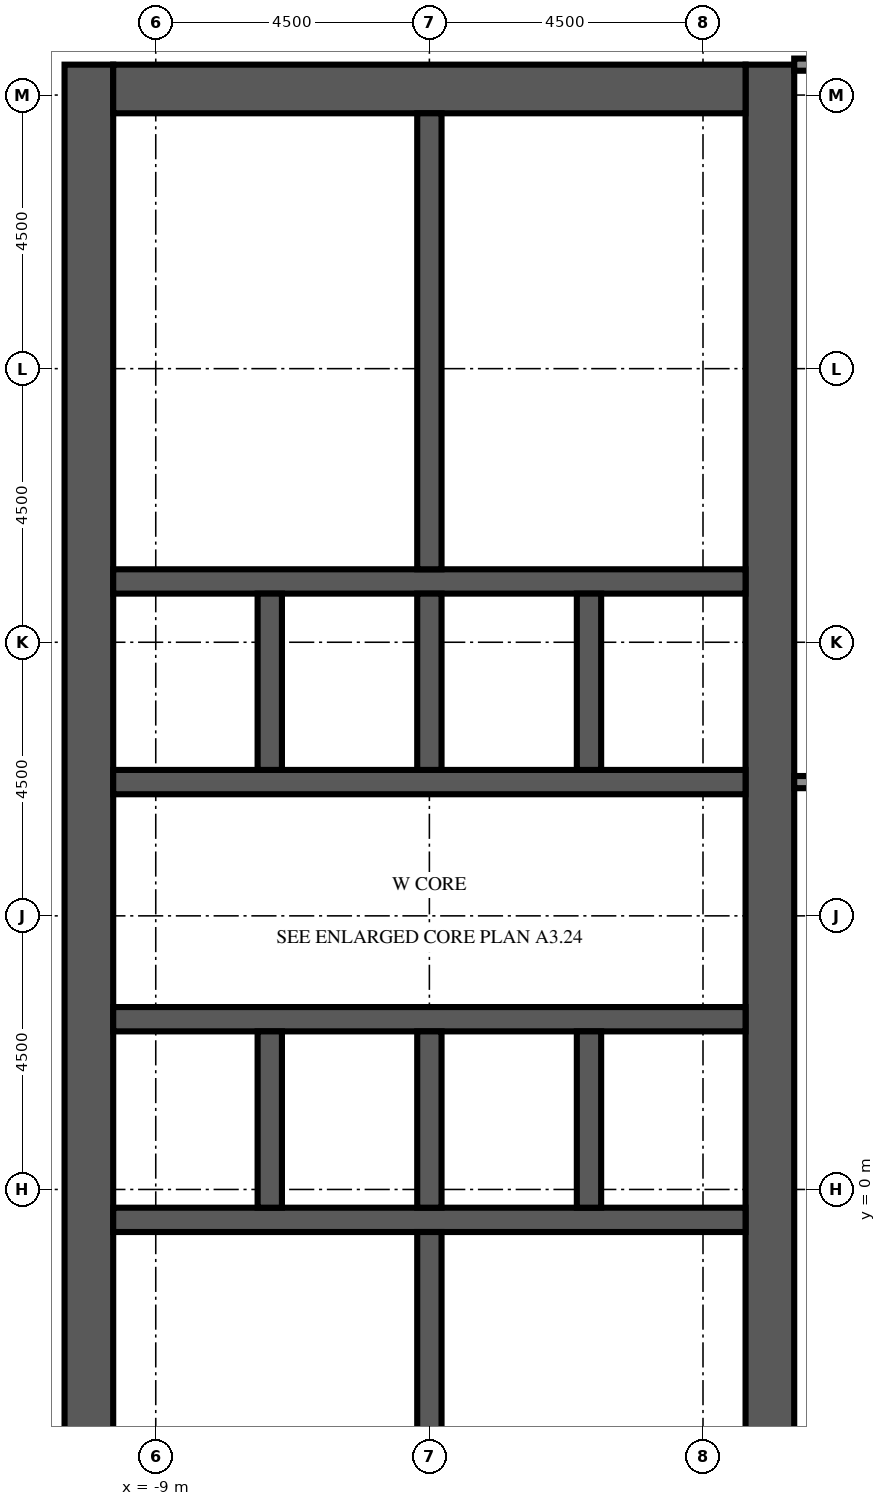
"""IFC4 building model, lengths in metres.
Left out: names, types, materials, properties, quantities, classifications, styles, units other than length and angle.
Written with IfcOpenShell. Run it as: python <this file> out.ifc"""

import sys

from ifc_helpers import new_model, si_unit, direction, frame, frame_2d, origin, place, context, subcontext, project, spatial, rectangle, extrude, element, fill, save


model = new_model("IFC4")
c1 = context("Model", 3, precision=1e-05, world=origin(), true_north=direction((0.0, 1.0)))
c2 = subcontext(c1, "Body", "Model", "MODEL_VIEW")
j1 = project(units=[si_unit("LENGTHUNIT", "METRE"), si_unit("PLANEANGLEUNIT", "RADIAN")], contexts=[c1])
p1 = place(None, origin())
s1 = spatial("IfcSite", under=j1, at=p1, CompositionType="ELEMENT")
p2 = place(p1, origin())
s2 = spatial("IfcBuilding", under=s1, at=p2, CompositionType="ELEMENT")
p3 = place(p2, frame((0.0, 0.0, 151.4)))
s3 = spatial("IfcBuildingStorey", under=s2, at=p3, CompositionType="ELEMENT", Elevation=151.4)
p4 = place(p3, frame((-10.1, -9.0, 0.0), z_axis=(0.0, 0.0, 1.0), x_axis=(0.0, 1.0, 0.0)))
e1 = element("IfcWall", 1, at=p4, inside=s3, PredefinedType="SHEAR", context=c2, shape_type="SweptSolid", body=[
    extrude(rectangle(XDim=27.5, YDim=0.8, at=frame_2d((13.75, 0.0))), origin(), (0.0, 0.0, 1.0), 5.4),
])
p5 = place(p4, frame((12.55, 0.0, 0.0)))
e2 = element("IfcOpeningElement", 2, at=p5, cuts=e1, PredefinedType="OPENING", context=c2, shape_type="SweptSolid", body=[
    extrude(rectangle(XDim=2.4, YDim=2.4, at=frame_2d((1.2, 1.2))), frame((0.0, 0.41, 0.0), z_axis=(0.0, -1.0, 0.0), x_axis=(1.0, 0.0, 0.0)), (0.0, 0.0, 1.0), 0.82),
])
p6 = place(p4, frame((6.825, 0.0, 0.0)))
e3 = element("IfcOpeningElement", 3, at=p6, cuts=e1, PredefinedType="OPENING", context=c2, shape_type="SweptSolid", body=[
    extrude(rectangle(XDim=1.2, YDim=2.1, at=frame_2d((0.6, 1.05))), frame((0.0, 0.41, 0.0), z_axis=(0.0, -1.0, 0.0), x_axis=(1.0, 0.0, 0.0)), (0.0, 0.0, 1.0), 0.82),
])
p7 = place(p4, frame((19.475, 0.0, 0.0)))
e4 = element("IfcOpeningElement", 4, at=p7, cuts=e1, PredefinedType="OPENING", context=c2, shape_type="SweptSolid", body=[
    extrude(rectangle(XDim=1.2, YDim=2.1, at=frame_2d((0.6, 1.05))), frame((0.0, 0.41, 0.0), z_axis=(0.0, -1.0, 0.0), x_axis=(1.0, 0.0, 0.0)), (0.0, 0.0, 1.0), 0.82),
])
p8 = place(p3, frame((1.1, -9.0, 0.0), z_axis=(0.0, 0.0, 1.0), x_axis=(0.0, 1.0, 0.0)))
e5 = element("IfcWall", 5, at=p8, inside=s3, PredefinedType="SHEAR", context=c2, shape_type="SweptSolid", body=[
    extrude(rectangle(XDim=27.5, YDim=0.8, at=frame_2d((13.75, 0.0))), origin(), (0.0, 0.0, 1.0), 5.4),
])
p9 = place(p8, frame((12.55, 0.0, 0.0)))
e6 = element("IfcOpeningElement", 6, at=p9, cuts=e5, PredefinedType="OPENING", context=c2, shape_type="SweptSolid", body=[
    extrude(rectangle(XDim=2.4, YDim=2.4, at=frame_2d((1.2, 1.2))), frame((0.0, 0.41, 0.0), z_axis=(0.0, -1.0, 0.0), x_axis=(1.0, 0.0, 0.0)), (0.0, 0.0, 1.0), 0.82),
])
p10 = place(p8, frame((5.45, 0.0, 0.0)))
e7 = element("IfcOpeningElement", 7, at=p10, cuts=e5, PredefinedType="OPENING", context=c2, shape_type="SweptSolid", body=[
    extrude(rectangle(XDim=1.2, YDim=2.1, at=frame_2d((0.6, 1.05))), frame((0.0, 0.41, 0.0), z_axis=(0.0, -1.0, 0.0), x_axis=(1.0, 0.0, 0.0)), (0.0, 0.0, 1.0), 0.82),
])
p11 = place(p8, frame((19.45, 0.0, 0.0)))
e8 = element("IfcOpeningElement", 8, at=p11, cuts=e5, PredefinedType="OPENING", context=c2, shape_type="SweptSolid", body=[
    extrude(rectangle(XDim=1.0, YDim=2.1, at=frame_2d((0.5, 1.05))), frame((0.0, 0.41, 0.0), z_axis=(0.0, -1.0, 0.0), x_axis=(1.0, 0.0, 0.0)), (0.0, 0.0, 1.0), 0.82),
])
p12 = place(p8, frame((21.137, 0.0, 0.0)))
e9 = element("IfcOpeningElement", 9, at=p12, cuts=e5, PredefinedType="OPENING", context=c2, shape_type="SweptSolid", body=[
    extrude(rectangle(XDim=1.0, YDim=2.1, at=frame_2d((0.5, 1.05))), frame((0.0, 0.41, 0.0), z_axis=(0.0, -1.0, 0.0), x_axis=(1.0, 0.0, 0.0)), (0.0, 0.0, 1.0), 0.82),
])
p13 = place(p8, frame((23.2, 0.0, 0.0)))
e10 = element("IfcOpeningElement", 10, at=p13, cuts=e5, PredefinedType="OPENING", context=c2, shape_type="SweptSolid", body=[
    extrude(rectangle(XDim=1.0, YDim=2.1, at=frame_2d((0.5, 1.05))), frame((0.0, 0.41, 0.0), z_axis=(0.0, -1.0, 0.0), x_axis=(1.0, 0.0, 0.0)), (0.0, 0.0, 1.0), 0.82),
])
p14 = place(p8, frame((25.262, 0.0, 0.0)))
e11 = element("IfcOpeningElement", 11, at=p14, cuts=e5, PredefinedType="OPENING", context=c2, shape_type="SweptSolid", body=[
    extrude(rectangle(XDim=1.0, YDim=2.1, at=frame_2d((0.5, 1.05))), frame((0.0, 0.41, 0.0), z_axis=(0.0, -1.0, 0.0), x_axis=(1.0, 0.0, 0.0)), (0.0, 0.0, 1.0), 0.82),
])
p15 = place(p3, frame((-9.7, 18.1, 0.0), z_axis=(0.0, 0.0, 1.0), x_axis=(1.0, 0.0, 0.0)))
e12 = element("IfcWall", 12, at=p15, inside=s3, PredefinedType="SHEAR", context=c2, shape_type="SweptSolid", body=[
    extrude(rectangle(XDim=10.4, YDim=0.8, at=frame_2d((5.2, 0.0))), origin(), (0.0, 0.0, 1.0), 5.4),
])
p16 = place(p3, frame((-9.7, -0.5, 0.0), z_axis=(0.0, 0.0, 1.0), x_axis=(1.0, 0.0, 0.0)))
e13 = element("IfcWall", 13, at=p16, inside=s3, PredefinedType="SHEAR", context=c2, shape_type="SweptSolid", body=[
    extrude(rectangle(XDim=10.4, YDim=0.4, at=frame_2d((5.2, 0.0))), origin(), (0.0, 0.0, 1.0), 5.4),
])
p17 = place(p3, frame((-9.7, 2.8, 0.0), z_axis=(0.0, 0.0, 1.0), x_axis=(1.0, 0.0, 0.0)))
e14 = element("IfcWall", 14, at=p17, inside=s3, PredefinedType="SHEAR", context=c2, shape_type="SweptSolid", body=[
    extrude(rectangle(XDim=10.4, YDim=0.4, at=frame_2d((5.2, 0.0))), origin(), (0.0, 0.0, 1.0), 5.4),
])
p18 = place(p17, frame((0.738, 0.0, 0.0)))
e15 = element("IfcOpeningElement", 15, at=p18, cuts=e14, PredefinedType="OPENING", context=c2, shape_type="SweptSolid", body=[
    extrude(rectangle(XDim=1.1, YDim=2.1, at=frame_2d((0.55, 1.05))), frame((0.0, 0.21, 0.0), z_axis=(0.0, -1.0, 0.0), x_axis=(1.0, 0.0, 0.0)), (0.0, 0.0, 1.0), 0.42),
])
p19 = place(p17, frame((3.337, 0.0, 0.0)))
e16 = element("IfcOpeningElement", 16, at=p19, cuts=e14, PredefinedType="OPENING", context=c2, shape_type="SweptSolid", body=[
    extrude(rectangle(XDim=1.1, YDim=2.1, at=frame_2d((0.55, 1.05))), frame((0.0, 0.21, 0.0), z_axis=(0.0, -1.0, 0.0), x_axis=(1.0, 0.0, 0.0)), (0.0, 0.0, 1.0), 0.42),
])
p20 = place(p17, frame((5.962, 0.0, 0.0)))
e17 = element("IfcOpeningElement", 17, at=p20, cuts=e14, PredefinedType="OPENING", context=c2, shape_type="SweptSolid", body=[
    extrude(rectangle(XDim=1.1, YDim=2.1, at=frame_2d((0.55, 1.05))), frame((0.0, 0.21, 0.0), z_axis=(0.0, -1.0, 0.0), x_axis=(1.0, 0.0, 0.0)), (0.0, 0.0, 1.0), 0.42),
])
p21 = place(p17, frame((8.613, 0.0, 0.0)))
e18 = element("IfcOpeningElement", 18, at=p21, cuts=e14, PredefinedType="OPENING", context=c2, shape_type="SweptSolid", body=[
    extrude(rectangle(XDim=1.0, YDim=2.1, at=frame_2d((0.5, 1.05))), frame((0.0, 0.21, 0.0), z_axis=(0.0, -1.0, 0.0), x_axis=(1.0, 0.0, 0.0)), (0.0, 0.0, 1.0), 0.42),
])
p22 = place(p3, frame((-9.7, 6.7, 0.0), z_axis=(0.0, 0.0, 1.0), x_axis=(1.0, 0.0, 0.0)))
e19 = element("IfcWall", 19, at=p22, inside=s3, PredefinedType="SHEAR", context=c2, shape_type="SweptSolid", body=[
    extrude(rectangle(XDim=10.4, YDim=0.4, at=frame_2d((5.2, 0.0))), origin(), (0.0, 0.0, 1.0), 5.4),
])
p23 = place(p22, frame((3.337, 0.0, 0.0)))
e20 = element("IfcOpeningElement", 20, at=p23, cuts=e19, PredefinedType="OPENING", context=c2, shape_type="SweptSolid", body=[
    extrude(rectangle(XDim=1.1, YDim=2.1, at=frame_2d((0.55, 1.05))), frame((0.0, 0.21, 0.0), z_axis=(0.0, -1.0, 0.0), x_axis=(1.0, 0.0, 0.0)), (0.0, 0.0, 1.0), 0.42),
])
p24 = place(p22, frame((5.962, 0.0, 0.0)))
e21 = element("IfcOpeningElement", 21, at=p24, cuts=e19, PredefinedType="OPENING", context=c2, shape_type="SweptSolid", body=[
    extrude(rectangle(XDim=1.1, YDim=2.1, at=frame_2d((0.55, 1.05))), frame((0.0, 0.21, 0.0), z_axis=(0.0, -1.0, 0.0), x_axis=(1.0, 0.0, 0.0)), (0.0, 0.0, 1.0), 0.42),
])
p25 = place(p22, frame((8.663, 0.0, 0.0)))
e22 = element("IfcOpeningElement", 22, at=p25, cuts=e19, PredefinedType="OPENING", context=c2, shape_type="SweptSolid", body=[
    extrude(rectangle(XDim=1.1, YDim=2.1, at=frame_2d((0.55, 1.05))), frame((0.0, 0.21, 0.0), z_axis=(0.0, -1.0, 0.0), x_axis=(1.0, 0.0, 0.0)), (0.0, 0.0, 1.0), 0.42),
])
p26 = place(p22, frame((0.688, 0.0, 0.0)))
e23 = element("IfcOpeningElement", 23, at=p26, cuts=e19, PredefinedType="OPENING", context=c2, shape_type="SweptSolid", body=[
    extrude(rectangle(XDim=1.0, YDim=2.1, at=frame_2d((0.5, 1.05))), frame((0.0, 0.21, 0.0), z_axis=(0.0, -1.0, 0.0), x_axis=(1.0, 0.0, 0.0)), (0.0, 0.0, 1.0), 0.42),
])
p27 = place(p3, frame((-9.7, 10.0, 0.0), z_axis=(0.0, 0.0, 1.0), x_axis=(1.0, 0.0, 0.0)))
e24 = element("IfcWall", 24, at=p27, inside=s3, PredefinedType="SHEAR", context=c2, shape_type="SweptSolid", body=[
    extrude(rectangle(XDim=10.4, YDim=0.4, at=frame_2d((5.2, 0.0))), origin(), (0.0, 0.0, 1.0), 5.4),
])
for number, where, z_axis, x_axis in (
    (25, (-7.125, -0.3, 0.0), (0.0, 0.0, 1.0), (0.0, 1.0, 0.0)),
    (26, (-7.125, 6.9, 0.0), (0.0, 0.0, 1.0), (0.0, 1.0, 0.0)),
    (27, (-4.5, -0.3, 0.0), (0.0, 0.0, 1.0), (0.0, 1.0, 0.0)),
    (28, (-4.5, 6.9, 0.0), (0.0, 0.0, 1.0), (0.0, 1.0, 0.0)),
    (29, (-1.875, -0.3, 0.0), (0.0, 0.0, 1.0), (0.0, 1.0, 0.0)),
    (30, (-1.875, 6.9, 0.0), (0.0, 0.0, 1.0), (0.0, 1.0, 0.0)),
):
    element("IfcWall", number, at=place(p3, frame(where, z_axis=z_axis, x_axis=x_axis)), inside=s3, PredefinedType="SHEAR", context=c2, shape_type="SweptSolid", body=[
        extrude(rectangle(XDim=2.9, YDim=0.4, at=frame_2d((1.45, 0.0))), origin(), (0.0, 0.0, 1.0), 5.4),
    ])
for number, where, z_axis, x_axis in (
    (31, (-4.5, -8.2, 0.0), (0.0, 0.0, 1.0), (0.0, 1.0, 0.0)),
    (32, (-4.5, 10.2, 0.0), (0.0, 0.0, 1.0), (0.0, 1.0, 0.0)),
):
    element("IfcWall", number, at=place(p3, frame(where, z_axis=z_axis, x_axis=x_axis)), inside=s3, PredefinedType="SHEAR", context=c2, shape_type="SweptSolid", body=[
        extrude(rectangle(XDim=7.5, YDim=0.4, at=frame_2d((3.75, 0.0))), origin(), (0.0, 0.0, 1.0), 5.4),
    ])
p28 = place(p3, frame((-0.8, -5.2, 0.0), z_axis=(0.0, 0.0, 1.0), x_axis=(0.0, 1.0, 0.0)))
e33 = element("IfcWall", 33, at=p28, inside=s3, PredefinedType="PARTITIONING", context=c2, shape_type="SweptSolid", body=[
    extrude(rectangle(XDim=2.25, YDim=0.1, at=frame_2d((1.125, 0.0))), origin(), (0.0, 0.0, 1.0), 4.95),
])
p29 = place(p28, frame((0.625, 0.0, 0.0)))
e34 = element("IfcOpeningElement", 34, at=p29, cuts=e33, PredefinedType="OPENING", context=c2, shape_type="SweptSolid", body=[
    extrude(rectangle(XDim=1.0, YDim=2.1, at=frame_2d((0.5, 1.05))), frame((0.0, 0.06, 0.0), z_axis=(0.0, -1.0, 0.0), x_axis=(1.0, 0.0, 0.0)), (0.0, 0.0, 1.0), 0.12),
])
p30 = place(p3, frame((-0.8, -2.95, 0.0), z_axis=(0.0, 0.0, 1.0), x_axis=(0.0, 1.0, 0.0)))
e35 = element("IfcWall", 35, at=p30, inside=s3, PredefinedType="PARTITIONING", context=c2, shape_type="SweptSolid", body=[
    extrude(rectangle(XDim=2.25, YDim=0.1, at=frame_2d((1.125, 0.0))), origin(), (0.0, 0.0, 1.0), 4.95),
])
p31 = place(p30, frame((0.625, 0.0, 0.0)))
e36 = element("IfcOpeningElement", 36, at=p31, cuts=e35, PredefinedType="OPENING", context=c2, shape_type="SweptSolid", body=[
    extrude(rectangle(XDim=1.0, YDim=2.1, at=frame_2d((0.5, 1.05))), frame((0.0, 0.06, 0.0), z_axis=(0.0, -1.0, 0.0), x_axis=(1.0, 0.0, 0.0)), (0.0, 0.0, 1.0), 0.12),
])
p32 = place(p3, frame((-4.3, -2.95, 0.0), z_axis=(0.0, 0.0, 1.0), x_axis=(1.0, 0.0, 0.0)))
e37 = element("IfcWall", 37, at=p32, inside=s3, PredefinedType="PARTITIONING", context=c2, shape_type="SweptSolid", body=[
    extrude(rectangle(XDim=3.5, YDim=0.1, at=frame_2d((1.75, 0.0))), origin(), (0.0, 0.0, 1.0), 4.95),
])
for number, where, z_axis, x_axis in (
    (38, (-4.3, 11.7, 0.0), (0.0, 0.0, 1.0), (1.0, 0.0, 0.0)),
    (39, (-4.3, 13.575, 0.0), (0.0, 0.0, 1.0), (1.0, 0.0, 0.0)),
    (40, (-4.3, 15.825, 0.0), (0.0, 0.0, 1.0), (1.0, 0.0, 0.0)),
):
    element("IfcWall", number, at=place(p3, frame(where, z_axis=z_axis, x_axis=x_axis)), inside=s3, PredefinedType="PARTITIONING", context=c2, shape_type="SweptSolid", body=[
        extrude(rectangle(XDim=5.0, YDim=0.1, at=frame_2d((2.5, 0.0))), origin(), (0.0, 0.0, 1.0), 4.95),
    ])
p33 = place(p3, frame((1.5, 6.7, 0.0), z_axis=(0.0, 0.0, 1.0), x_axis=(1.0, 0.0, 0.0)))
e41 = element("IfcWall", 41, at=p33, inside=s3, PredefinedType="PARTITIONING", context=c2, shape_type="SweptSolid", body=[
    extrude(rectangle(XDim=4.5, YDim=0.2, at=frame_2d((2.25, 0.0))), origin(), (0.0, 0.0, 1.0), 4.95),
])
p34 = place(p33, frame((1.85, 0.0, 0.0)))
e42 = element("IfcOpeningElement", 42, at=p34, cuts=e41, PredefinedType="OPENING", context=c2, shape_type="SweptSolid", body=[
    extrude(rectangle(XDim=1.0, YDim=2.1, at=frame_2d((0.5, 1.05))), frame((0.0, 0.11, 0.0), z_axis=(0.0, -1.0, 0.0), x_axis=(1.0, 0.0, 0.0)), (0.0, 0.0, 1.0), 0.22),
])
p35 = place(p3, frame((1.5, 18.5, 0.0), z_axis=(0.0, 0.0, 1.0), x_axis=(1.0, 0.0, 0.0)))
e43 = element("IfcWall", 43, at=p35, inside=s3, PredefinedType="PARTITIONING", context=c2, shape_type="SweptSolid", body=[
    extrude(rectangle(XDim=4.5, YDim=0.2, at=frame_2d((2.25, 0.0))), origin(), (0.0, 0.0, 1.0), 4.95),
])
p36 = place(p18, origin())
e44 = element("IfcDoor", 44, at=p36, inside=s3, OperationType="DOUBLE_DOOR_SLIDING", PredefinedType="DOOR", context=c2, shape_type="SweptSolid", body=[
    extrude(rectangle(XDim=1.1, YDim=2.1, at=frame_2d((0.55, 1.05))), frame((0.0, 0.025, 0.0), z_axis=(0.0, -1.0, 0.0), x_axis=(1.0, 0.0, 0.0)), (0.0, 0.0, 1.0), 0.05),
])
fill(e15, e44)
p37 = place(p19, origin())
e45 = element("IfcDoor", 45, at=p37, inside=s3, OperationType="DOUBLE_DOOR_SLIDING", PredefinedType="DOOR", context=c2, shape_type="SweptSolid", body=[
    extrude(rectangle(XDim=1.1, YDim=2.1, at=frame_2d((0.55, 1.05))), frame((0.0, 0.025, 0.0), z_axis=(0.0, -1.0, 0.0), x_axis=(1.0, 0.0, 0.0)), (0.0, 0.0, 1.0), 0.05),
])
fill(e16, e45)
p38 = place(p20, origin())
e46 = element("IfcDoor", 46, at=p38, inside=s3, OperationType="DOUBLE_DOOR_SLIDING", PredefinedType="DOOR", context=c2, shape_type="SweptSolid", body=[
    extrude(rectangle(XDim=1.1, YDim=2.1, at=frame_2d((0.55, 1.05))), frame((0.0, 0.025, 0.0), z_axis=(0.0, -1.0, 0.0), x_axis=(1.0, 0.0, 0.0)), (0.0, 0.0, 1.0), 0.05),
])
fill(e17, e46)
p39 = place(p23, origin())
e47 = element("IfcDoor", 47, at=p39, inside=s3, OperationType="DOUBLE_DOOR_SLIDING", PredefinedType="DOOR", context=c2, shape_type="SweptSolid", body=[
    extrude(rectangle(XDim=1.1, YDim=2.1, at=frame_2d((0.55, 1.05))), frame((0.0, 0.025, 0.0), z_axis=(0.0, -1.0, 0.0), x_axis=(1.0, 0.0, 0.0)), (0.0, 0.0, 1.0), 0.05),
])
fill(e20, e47)
p40 = place(p24, origin())
e48 = element("IfcDoor", 48, at=p40, inside=s3, OperationType="DOUBLE_DOOR_SLIDING", PredefinedType="DOOR", context=c2, shape_type="SweptSolid", body=[
    extrude(rectangle(XDim=1.1, YDim=2.1, at=frame_2d((0.55, 1.05))), frame((0.0, 0.025, 0.0), z_axis=(0.0, -1.0, 0.0), x_axis=(1.0, 0.0, 0.0)), (0.0, 0.0, 1.0), 0.05),
])
fill(e21, e48)
p41 = place(p25, origin())
e49 = element("IfcDoor", 49, at=p41, inside=s3, OperationType="DOUBLE_DOOR_SLIDING", PredefinedType="DOOR", context=c2, shape_type="SweptSolid", body=[
    extrude(rectangle(XDim=1.1, YDim=2.1, at=frame_2d((0.55, 1.05))), frame((0.0, 0.025, 0.0), z_axis=(0.0, -1.0, 0.0), x_axis=(1.0, 0.0, 0.0)), (0.0, 0.0, 1.0), 0.05),
])
fill(e22, e49)
p42 = place(p5, origin())
e50 = element("IfcDoor", 50, at=p42, inside=s3, OperationType="DOUBLE_DOOR_DOUBLE_SWING", PredefinedType="DOOR", context=c2, shape_type="SweptSolid", body=[
    extrude(rectangle(XDim=2.4, YDim=2.4, at=frame_2d((1.2, 1.2))), frame((0.0, 0.025, 0.0), z_axis=(0.0, -1.0, 0.0), x_axis=(1.0, 0.0, 0.0)), (0.0, 0.0, 1.0), 0.05),
])
fill(e2, e50)
p43 = place(p9, origin())
e51 = element("IfcDoor", 51, at=p43, inside=s3, OperationType="DOUBLE_DOOR_DOUBLE_SWING", PredefinedType="DOOR", context=c2, shape_type="SweptSolid", body=[
    extrude(rectangle(XDim=2.4, YDim=2.4, at=frame_2d((1.2, 1.2))), frame((0.0, 0.025, 0.0), z_axis=(0.0, -1.0, 0.0), x_axis=(1.0, 0.0, 0.0)), (0.0, 0.0, 1.0), 0.05),
])
fill(e6, e51)
p44 = place(p6, origin())
e52 = element("IfcDoor", 52, at=p44, inside=s3, OperationType="SINGLE_SWING_LEFT", PredefinedType="DOOR", context=c2, shape_type="SweptSolid", body=[
    extrude(rectangle(XDim=1.2, YDim=2.1, at=frame_2d((0.6, 1.05))), frame((0.0, 0.025, 0.0), z_axis=(0.0, -1.0, 0.0), x_axis=(1.0, 0.0, 0.0)), (0.0, 0.0, 1.0), 0.05),
])
fill(e3, e52)
p45 = place(p7, origin())
e53 = element("IfcDoor", 53, at=p45, inside=s3, OperationType="SINGLE_SWING_LEFT", PredefinedType="DOOR", context=c2, shape_type="SweptSolid", body=[
    extrude(rectangle(XDim=1.2, YDim=2.1, at=frame_2d((0.6, 1.05))), frame((0.0, 0.025, 0.0), z_axis=(0.0, -1.0, 0.0), x_axis=(1.0, 0.0, 0.0)), (0.0, 0.0, 1.0), 0.05),
])
fill(e4, e53)
p46 = place(p21, origin())
e54 = element("IfcDoor", 54, at=p46, inside=s3, OperationType="SINGLE_SWING_RIGHT", PredefinedType="DOOR", context=c2, shape_type="SweptSolid", body=[
    extrude(rectangle(XDim=1.0, YDim=2.1, at=frame_2d((0.5, 1.05))), frame((0.0, 0.025, 0.0), z_axis=(0.0, -1.0, 0.0), x_axis=(1.0, 0.0, 0.0)), (0.0, 0.0, 1.0), 0.05),
])
fill(e18, e54)
p47 = place(p26, origin())
e55 = element("IfcDoor", 55, at=p47, inside=s3, OperationType="SINGLE_SWING_LEFT", PredefinedType="DOOR", context=c2, shape_type="SweptSolid", body=[
    extrude(rectangle(XDim=1.0, YDim=2.1, at=frame_2d((0.5, 1.05))), frame((0.0, 0.025, 0.0), z_axis=(0.0, -1.0, 0.0), x_axis=(1.0, 0.0, 0.0)), (0.0, 0.0, 1.0), 0.05),
])
fill(e23, e55)
p48 = place(p10, origin())
e56 = element("IfcDoor", 56, at=p48, inside=s3, OperationType="SINGLE_SWING_LEFT", PredefinedType="DOOR", context=c2, shape_type="SweptSolid", body=[
    extrude(rectangle(XDim=1.2, YDim=2.1, at=frame_2d((0.6, 1.05))), frame((0.0, 0.375, 0.0), z_axis=(0.0, -1.0, 0.0), x_axis=(1.0, 0.0, 0.0)), (0.0, 0.0, 1.0), 0.05),
])
fill(e7, e56)
p49 = place(p29, origin())
e57 = element("IfcDoor", 57, at=p49, inside=s3, OperationType="SINGLE_SWING_LEFT", PredefinedType="DOOR", context=c2, shape_type="SweptSolid", body=[
    extrude(rectangle(XDim=1.0, YDim=2.1, at=frame_2d((0.5, 1.05))), frame((0.0, 0.025, 0.0), z_axis=(0.0, -1.0, 0.0), x_axis=(1.0, 0.0, 0.0)), (0.0, 0.0, 1.0), 0.05),
])
fill(e34, e57)
p50 = place(p31, origin())
e58 = element("IfcDoor", 58, at=p50, inside=s3, OperationType="SINGLE_SWING_RIGHT", PredefinedType="DOOR", context=c2, shape_type="SweptSolid", body=[
    extrude(rectangle(XDim=1.0, YDim=2.1, at=frame_2d((0.5, 1.05))), frame((0.0, 0.025, 0.0), z_axis=(0.0, -1.0, 0.0), x_axis=(1.0, 0.0, 0.0)), (0.0, 0.0, 1.0), 0.05),
])
fill(e36, e58)
p51 = place(p11, origin())
e59 = element("IfcDoor", 59, at=p51, inside=s3, OperationType="SINGLE_SWING_LEFT", PredefinedType="DOOR", context=c2, shape_type="SweptSolid", body=[
    extrude(rectangle(XDim=1.0, YDim=2.1, at=frame_2d((0.5, 1.05))), frame((0.0, 0.375, 0.0), z_axis=(0.0, -1.0, 0.0), x_axis=(1.0, 0.0, 0.0)), (0.0, 0.0, 1.0), 0.05),
])
fill(e8, e59)
p52 = place(p12, origin())
e60 = element("IfcDoor", 60, at=p52, inside=s3, OperationType="SINGLE_SWING_RIGHT", PredefinedType="DOOR", context=c2, shape_type="SweptSolid", body=[
    extrude(rectangle(XDim=1.0, YDim=2.1, at=frame_2d((0.5, 1.05))), frame((0.0, 0.375, 0.0), z_axis=(0.0, -1.0, 0.0), x_axis=(1.0, 0.0, 0.0)), (0.0, 0.0, 1.0), 0.05),
])
fill(e9, e60)
p53 = place(p13, origin())
e61 = element("IfcDoor", 61, at=p53, inside=s3, OperationType="SINGLE_SWING_LEFT", PredefinedType="DOOR", context=c2, shape_type="SweptSolid", body=[
    extrude(rectangle(XDim=1.0, YDim=2.1, at=frame_2d((0.5, 1.05))), frame((0.0, 0.375, 0.0), z_axis=(0.0, -1.0, 0.0), x_axis=(1.0, 0.0, 0.0)), (0.0, 0.0, 1.0), 0.05),
])
fill(e10, e61)
p54 = place(p14, origin())
e62 = element("IfcDoor", 62, at=p54, inside=s3, OperationType="SINGLE_SWING_RIGHT", PredefinedType="DOOR", context=c2, shape_type="SweptSolid", body=[
    extrude(rectangle(XDim=1.0, YDim=2.1, at=frame_2d((0.5, 1.05))), frame((0.0, 0.375, 0.0), z_axis=(0.0, -1.0, 0.0), x_axis=(1.0, 0.0, 0.0)), (0.0, 0.0, 1.0), 0.05),
])
fill(e11, e62)
save(model, sys.argv[1])
